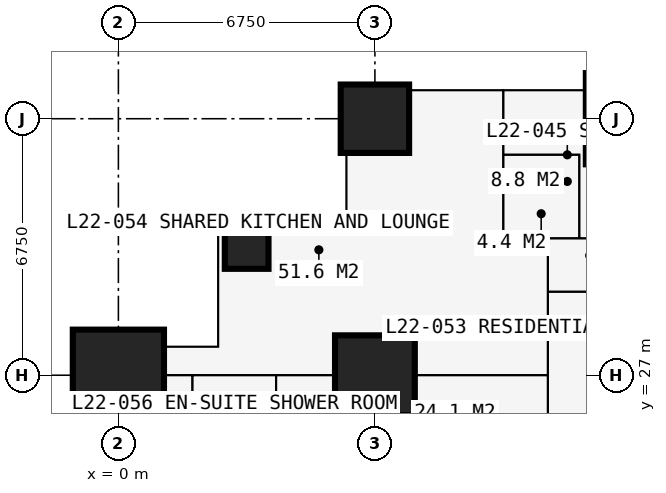
"""IFC4 building model, lengths in metres.
Left out: names, types, materials, properties, quantities, classifications, styles, units other than length and angle.
Written with IfcOpenShell. Run it as: python <this file> out.ifc"""

import sys

from ifc_helpers import new_model, si_unit, direction, frame, frame_2d, origin, origin_2d, place, context, subcontext, project, spatial, rectangle, extrude, element, fill, save


model = new_model("IFC4")
c1 = context("Model", 3, precision=1e-05, world=origin(), true_north=direction((0.0, 1.0)))
c2 = subcontext(c1, "Body", "Model", "MODEL_VIEW")
j1 = project(units=[si_unit("LENGTHUNIT", "METRE"), si_unit("PLANEANGLEUNIT", "RADIAN")], contexts=[c1])
p1 = place(None, origin())
s1 = spatial("IfcSite", under=j1, at=p1, CompositionType="ELEMENT")
p2 = place(p1, origin())
s2 = spatial("IfcBuilding", under=s1, at=p2, CompositionType="ELEMENT")
p3 = place(p2, frame((0.0, 0.0, 83.7)))
s3 = spatial("IfcBuildingStorey", under=s2, at=p3, CompositionType="ELEMENT", Elevation=83.7)
p4 = place(p3, frame((0.0, 27.0, 0.0), z_axis=(0.0, 0.0, 1.0), x_axis=(1.0, 0.0, 0.0)))
e1 = element("IfcColumn", 1, at=p4, inside=s3, PredefinedType="COLUMN", context=c2, shape_type="SweptSolid", body=[
    extrude(rectangle(XDim=2.4, YDim=2.4, at=origin_2d()), origin(), (0.0, 0.0, 1.0), 3.6),
])
p5 = place(p3, frame((3.375, 30.375, 0.0), z_axis=(0.0, 0.0, 1.0), x_axis=(1.0, 0.0, 0.0)))
e2 = element("IfcColumn", 2, at=p5, inside=s3, PredefinedType="COLUMN", context=c2, shape_type="SweptSolid", body=[
    extrude(rectangle(XDim=1.15, YDim=1.15, at=origin_2d()), origin(), (0.0, 0.0, 1.0), 3.6),
])
p6 = place(p3, frame((6.75, 27.0, 0.0), z_axis=(0.0, 0.0, 1.0), x_axis=(1.0, 0.0, 0.0)))
e3 = element("IfcColumn", 3, at=p6, inside=s3, PredefinedType="COLUMN", context=c2, shape_type="SweptSolid", body=[
    extrude(rectangle(XDim=2.1, YDim=2.1, at=origin_2d()), origin(), (0.0, 0.0, 1.0), 3.6),
])
p7 = place(p3, frame((6.75, 33.75, 0.0), z_axis=(0.0, 0.0, 1.0), x_axis=(1.0, 0.0, 0.0)))
e4 = element("IfcColumn", 4, at=p7, inside=s3, PredefinedType="COLUMN", context=c2, shape_type="SweptSolid", body=[
    extrude(rectangle(XDim=1.8, YDim=1.8, at=origin_2d()), origin(), (0.0, 0.0, 1.0), 3.6),
])
p8 = place(p3, frame((6.0, 34.5, 0.0), z_axis=(0.0, 0.0, 1.0), x_axis=(0.0, -1.0, 0.0)))
e5 = element("IfcWall", 5, at=p8, inside=s3, PredefinedType="SOLIDWALL", context=c2, shape_type="SweptSolid", body=[
    extrude(rectangle(XDim=3.375, YDim=0.3, at=frame_2d((1.688, 0.0))), origin(), (0.0, 0.0, 1.0), 3.375),
])
p9 = place(p8, frame((1.833, 0.0, 0.9)))
e6 = element("IfcOpeningElement", 6, at=p9, cuts=e5, PredefinedType="OPENING", context=c2, shape_type="SweptSolid", body=[
    extrude(rectangle(XDim=1.2, YDim=1.8, at=frame_2d((0.6, 0.9))), frame((0.0, 0.16, 0.0), z_axis=(0.0, -1.0, 0.0), x_axis=(1.0, 0.0, 0.0)), (0.0, 0.0, 1.0), 0.32),
])
p10 = place(p3, frame((6.0, 31.125, 0.0), z_axis=(0.0, 0.0, 1.0), x_axis=(-1.0, 0.0, 0.0)))
e7 = element("IfcWall", 7, at=p10, inside=s3, PredefinedType="SOLIDWALL", context=c2, shape_type="SweptSolid", body=[
    extrude(rectangle(XDim=3.375, YDim=0.3, at=frame_2d((1.688, 0.0))), origin(), (0.0, 0.0, 1.0), 3.375),
])
p11 = place(p10, frame((0.788, 0.0, 0.6)))
e8 = element("IfcOpeningElement", 8, at=p11, cuts=e7, PredefinedType="OPENING", context=c2, shape_type="SweptSolid", body=[
    extrude(rectangle(XDim=1.8, YDim=2.1, at=frame_2d((0.9, 1.05))), frame((0.0, 0.16, 0.0), z_axis=(0.0, -1.0, 0.0), x_axis=(1.0, 0.0, 0.0)), (0.0, 0.0, 1.0), 0.32),
])
p12 = place(p3, frame((2.625, 31.125, 0.0), z_axis=(0.0, 0.0, 1.0), x_axis=(0.0, -1.0, 0.0)))
e9 = element("IfcWall", 9, at=p12, inside=s3, PredefinedType="SOLIDWALL", context=c2, shape_type="SweptSolid", body=[
    extrude(rectangle(XDim=3.375, YDim=0.3, at=frame_2d((1.688, 0.0))), origin(), (0.0, 0.0, 1.0), 3.375),
])
p13 = place(p12, frame((0.788, 0.0, 0.6)))
e10 = element("IfcOpeningElement", 10, at=p13, cuts=e9, PredefinedType="OPENING", context=c2, shape_type="SweptSolid", body=[
    extrude(rectangle(XDim=1.8, YDim=2.1, at=frame_2d((0.9, 1.05))), frame((0.0, 0.16, 0.0), z_axis=(0.0, -1.0, 0.0), x_axis=(1.0, 0.0, 0.0)), (0.0, 0.0, 1.0), 0.32),
])
p14 = place(p3, frame((2.625, 27.75, 0.0), z_axis=(0.0, 0.0, 1.0), x_axis=(-1.0, 0.0, 0.0)))
e11 = element("IfcWall", 11, at=p14, inside=s3, PredefinedType="SOLIDWALL", context=c2, shape_type="SweptSolid", body=[
    extrude(rectangle(XDim=3.375, YDim=0.3, at=frame_2d((1.688, 0.0))), origin(), (0.0, 0.0, 1.0), 3.375),
])
p15 = place(p14, frame((0.192, 0.0, 0.9)))
e12 = element("IfcOpeningElement", 12, at=p15, cuts=e11, PredefinedType="OPENING", context=c2, shape_type="SweptSolid", body=[
    extrude(rectangle(XDim=1.2, YDim=1.8, at=frame_2d((0.6, 0.9))), frame((0.0, 0.16, 0.0), z_axis=(0.0, -1.0, 0.0), x_axis=(1.0, 0.0, 0.0)), (0.0, 0.0, 1.0), 0.32),
])
p16 = place(p3, frame((-0.734, 27.0, 0.0), z_axis=(0.0, 0.0, 1.0), x_axis=(1.0, 0.0, 0.0)))
e13 = element("IfcWall", 13, at=p16, inside=s3, PredefinedType="PARTITIONING", context=c2, shape_type="SweptSolid", body=[
    extrude(rectangle(XDim=12.034, YDim=0.15, at=frame_2d((6.017, 0.0))), origin(), (0.0, 0.0, 1.0), 2.806),
])
p17 = place(p16, frame((8.534, 0.0, 0.0)))
e14 = element("IfcOpeningElement", 14, at=p17, cuts=e13, PredefinedType="OPENING", context=c2, shape_type="SweptSolid", body=[
    extrude(rectangle(XDim=1.0, YDim=2.2, at=frame_2d((0.5, 1.1))), frame((0.0, 0.085, 0.0), z_axis=(0.0, -1.0, 0.0), x_axis=(1.0, 0.0, 0.0)), (0.0, 0.0, 1.0), 0.17),
])
p18 = place(p3, frame((1.95, 25.0, 0.0), z_axis=(0.0, 0.0, 1.0), x_axis=(0.0, 1.0, 0.0)))
e15 = element("IfcWall", 15, at=p18, inside=s3, PredefinedType="PARTITIONING", context=c2, shape_type="SweptSolid", body=[
    extrude(rectangle(XDim=2.0, YDim=0.1, at=frame_2d((1.0, 0.0))), origin(), (0.0, 0.0, 1.0), 3.375),
])
p19 = place(p3, frame((4.15, 10.125, 0.0), z_axis=(0.0, 0.0, 1.0), x_axis=(0.0, 1.0, 0.0)))
e16 = element("IfcWall", 16, at=p19, inside=s3, PredefinedType="PARTITIONING", context=c2, shape_type="SweptSolid", body=[
    extrude(rectangle(XDim=16.875, YDim=0.15, at=frame_2d((8.438, 0.0))), origin(), (0.0, 0.0, 1.0), 3.375),
])
p20 = place(p19, frame((13.7, 0.0, 0.0)))
e17 = element("IfcOpeningElement", 17, at=p20, cuts=e16, PredefinedType="OPENING", context=c2, shape_type="SweptSolid", body=[
    extrude(rectangle(XDim=0.95, YDim=2.2, at=frame_2d((0.475, 1.1))), frame((0.0, 0.085, 0.0), z_axis=(0.0, -1.0, 0.0), x_axis=(1.0, 0.0, 0.0)), (0.0, 0.0, 1.0), 0.17),
])
p21 = place(p19, frame((7.575, 0.0, 0.0)))
e18 = element("IfcOpeningElement", 18, at=p21, cuts=e16, PredefinedType="OPENING", context=c2, shape_type="SweptSolid", body=[
    extrude(rectangle(XDim=0.95, YDim=2.2, at=frame_2d((0.475, 1.1))), frame((0.0, 0.085, 0.0), z_axis=(0.0, -1.0, 0.0), x_axis=(1.0, 0.0, 0.0)), (0.0, 0.0, 1.0), 0.17),
])
p22 = place(p19, frame((0.2, 0.0, 0.0)))
e19 = element("IfcOpeningElement", 19, at=p22, cuts=e16, PredefinedType="OPENING", context=c2, shape_type="SweptSolid", body=[
    extrude(rectangle(XDim=0.95, YDim=2.2, at=frame_2d((0.475, 1.1))), frame((0.0, 0.085, 0.0), z_axis=(0.0, -1.0, 0.0), x_axis=(1.0, 0.0, 0.0)), (0.0, 0.0, 1.0), 0.17),
])
p23 = place(p19, frame((10.375, 0.0, 0.0)))
e20 = element("IfcOpeningElement", 20, at=p23, cuts=e16, PredefinedType="OPENING", context=c2, shape_type="SweptSolid", body=[
    extrude(rectangle(XDim=0.95, YDim=2.2, at=frame_2d((0.475, 1.1))), frame((0.0, 0.085, 0.0), z_axis=(0.0, -1.0, 0.0), x_axis=(1.0, 0.0, 0.0)), (0.0, 0.0, 1.0), 0.17),
])
p24 = place(p3, frame((10.125, 30.6, 0.0), z_axis=(0.0, 0.0, 1.0), x_axis=(0.0, 1.0, 0.0)))
e21 = element("IfcWall", 21, at=p24, inside=s3, PredefinedType="PARTITIONING", context=c2, shape_type="SweptSolid", body=[
    extrude(rectangle(XDim=3.884, YDim=0.1, at=frame_2d((1.942, 0.0))), origin(), (0.0, 0.0, 1.0), 3.375),
])
p25 = place(p3, frame((10.125, 30.6, 0.0), z_axis=(0.0, 0.0, 1.0), x_axis=(1.0, 0.0, 0.0)))
e22 = element("IfcWall", 22, at=p25, inside=s3, PredefinedType="PARTITIONING", context=c2, shape_type="SweptSolid", body=[
    extrude(rectangle(XDim=3.375, YDim=0.1, at=frame_2d((1.688, 0.0))), origin(), (0.0, 0.0, 1.0), 3.375),
])
p26 = place(p25, frame((2.2, 0.0, 0.0)))
e23 = element("IfcOpeningElement", 23, at=p26, cuts=e22, PredefinedType="OPENING", context=c2, shape_type="SweptSolid", body=[
    extrude(rectangle(XDim=0.95, YDim=2.2, at=frame_2d((0.475, 1.1))), frame((0.0, 0.06, 0.0), z_axis=(0.0, -1.0, 0.0), x_axis=(1.0, 0.0, 0.0)), (0.0, 0.0, 1.0), 0.12),
])
p27 = place(p3, frame((10.125, 32.8, 0.0), z_axis=(0.0, 0.0, 1.0), x_axis=(1.0, 0.0, 0.0)))
e24 = element("IfcWall", 24, at=p27, inside=s3, PredefinedType="PARTITIONING", context=c2, shape_type="SweptSolid", body=[
    extrude(rectangle(XDim=2.0, YDim=0.1, at=frame_2d((1.0, 0.0))), origin(), (0.0, 0.0, 1.0), 3.375),
])
p28 = place(p3, frame((11.3, 11.3, 0.0), z_axis=(0.0, 0.0, 1.0), x_axis=(0.0, 1.0, 0.0)))
e25 = element("IfcWall", 25, at=p28, inside=s3, PredefinedType="PARTITIONING", context=c2, shape_type="SweptSolid", body=[
    extrude(rectangle(XDim=19.3, YDim=0.15, at=frame_2d((9.65, 0.0))), origin(), (0.0, 0.0, 1.0), 3.375),
])
p29 = place(p28, frame((13.525, 0.0, 0.0)))
e26 = element("IfcOpeningElement", 26, at=p29, cuts=e25, PredefinedType="OPENING", context=c2, shape_type="SweptSolid", body=[
    extrude(rectangle(XDim=1.0, YDim=2.2, at=frame_2d((0.5, 1.1))), frame((0.0, 0.085, 0.0), z_axis=(0.0, -1.0, 0.0), x_axis=(1.0, 0.0, 0.0)), (0.0, 0.0, 1.0), 0.17),
])
p30 = place(p28, frame((10.438, 0.0, 0.0)))
e27 = element("IfcOpeningElement", 27, at=p30, cuts=e25, PredefinedType="OPENING", context=c2, shape_type="SweptSolid", body=[
    extrude(rectangle(XDim=1.0, YDim=2.2, at=frame_2d((0.5, 1.1))), frame((0.0, 0.085, 0.0), z_axis=(0.0, -1.0, 0.0), x_axis=(1.0, 0.0, 0.0)), (0.0, 0.0, 1.0), 0.17),
])
p31 = place(p3, frame((11.3, 29.2, 0.0), z_axis=(0.0, 0.0, 1.0), x_axis=(1.0, 0.0, 0.0)))
e28 = element("IfcWall", 28, at=p31, inside=s3, PredefinedType="PARTITIONING", context=c2, shape_type="SweptSolid", body=[
    extrude(rectangle(XDim=19.075, YDim=0.15, at=frame_2d((9.538, 0.0))), origin(), (0.0, 0.0, 1.0), 3.375),
])
p32 = place(p31, frame((5.825, 0.0, 0.0)))
e29 = element("IfcOpeningElement", 29, at=p32, cuts=e28, PredefinedType="OPENING", context=c2, shape_type="SweptSolid", body=[
    extrude(rectangle(XDim=0.95, YDim=2.2, at=frame_2d((0.475, 1.1))), frame((0.0, 0.085, 0.0), z_axis=(0.0, -1.0, 0.0), x_axis=(1.0, 0.0, 0.0)), (0.0, 0.0, 1.0), 0.17),
])
p33 = place(p31, frame((9.2, 0.0, 0.0)))
e30 = element("IfcOpeningElement", 30, at=p33, cuts=e28, PredefinedType="OPENING", context=c2, shape_type="SweptSolid", body=[
    extrude(rectangle(XDim=0.95, YDim=2.2, at=frame_2d((0.475, 1.1))), frame((0.0, 0.085, 0.0), z_axis=(0.0, -1.0, 0.0), x_axis=(1.0, 0.0, 0.0)), (0.0, 0.0, 1.0), 0.17),
])
p34 = place(p31, frame((0.6, 0.0, 0.0)))
e31 = element("IfcOpeningElement", 31, at=p34, cuts=e28, PredefinedType="OPENING", context=c2, shape_type="SweptSolid", body=[
    extrude(rectangle(XDim=1.0, YDim=2.2, at=frame_2d((0.5, 1.1))), frame((0.0, 0.085, 0.0), z_axis=(0.0, -1.0, 0.0), x_axis=(1.0, 0.0, 0.0)), (0.0, 0.0, 1.0), 0.17),
])
p35 = place(p3, frame((12.125, 30.6, 0.0), z_axis=(0.0, 0.0, 1.0), x_axis=(0.0, 1.0, 0.0)))
e32 = element("IfcWall", 32, at=p35, inside=s3, PredefinedType="PARTITIONING", context=c2, shape_type="SweptSolid", body=[
    extrude(rectangle(XDim=2.2, YDim=0.1, at=frame_2d((1.1, 0.0))), origin(), (0.0, 0.0, 1.0), 3.375),
])
p36 = place(p35, frame((0.65, 0.0, 0.0)))
e33 = element("IfcOpeningElement", 33, at=p36, cuts=e32, PredefinedType="OPENING", context=c2, shape_type="SweptSolid", body=[
    extrude(rectangle(XDim=0.9, YDim=2.2, at=frame_2d((0.45, 1.1))), frame((0.0, 0.06, 0.0), z_axis=(0.0, -1.0, 0.0), x_axis=(1.0, 0.0, 0.0)), (0.0, 0.0, 1.0), 0.12),
])
p37 = place(p9, origin())
e34 = element("IfcWindow", 34, at=p37, inside=s3, PartitioningType="SINGLE_PANEL", PredefinedType="WINDOW", context=c2, shape_type="SweptSolid", body=[
    extrude(rectangle(XDim=1.2, YDim=1.8, at=frame_2d((0.6, 0.9))), frame((0.0, 0.03, 0.0), z_axis=(0.0, -1.0, 0.0), x_axis=(1.0, 0.0, 0.0)), (0.0, 0.0, 1.0), 0.06),
])
fill(e6, e34)
p38 = place(p11, origin())
e35 = element("IfcWindow", 35, at=p38, inside=s3, PartitioningType="SINGLE_PANEL", PredefinedType="WINDOW", context=c2, shape_type="SweptSolid", body=[
    extrude(rectangle(XDim=1.8, YDim=2.1, at=frame_2d((0.9, 1.05))), frame((0.0, 0.03, 0.0), z_axis=(0.0, -1.0, 0.0), x_axis=(1.0, 0.0, 0.0)), (0.0, 0.0, 1.0), 0.06),
])
fill(e8, e35)
p39 = place(p13, origin())
e36 = element("IfcWindow", 36, at=p39, inside=s3, PartitioningType="SINGLE_PANEL", PredefinedType="WINDOW", context=c2, shape_type="SweptSolid", body=[
    extrude(rectangle(XDim=1.8, YDim=2.1, at=frame_2d((0.9, 1.05))), frame((0.0, 0.03, 0.0), z_axis=(0.0, -1.0, 0.0), x_axis=(1.0, 0.0, 0.0)), (0.0, 0.0, 1.0), 0.06),
])
fill(e10, e36)
p40 = place(p15, origin())
e37 = element("IfcWindow", 37, at=p40, inside=s3, PartitioningType="SINGLE_PANEL", PredefinedType="WINDOW", context=c2, shape_type="SweptSolid", body=[
    extrude(rectangle(XDim=1.2, YDim=1.8, at=frame_2d((0.6, 0.9))), frame((0.0, 0.03, 0.0), z_axis=(0.0, -1.0, 0.0), x_axis=(1.0, 0.0, 0.0)), (0.0, 0.0, 1.0), 0.06),
])
fill(e12, e37)
p41 = place(p36, origin())
e38 = element("IfcDoor", 38, at=p41, inside=s3, OperationType="SINGLE_SWING_RIGHT", PredefinedType="DOOR", context=c2, shape_type="SweptSolid", body=[
    extrude(rectangle(XDim=0.9, YDim=2.2, at=frame_2d((0.45, 1.1))), frame((0.0, 0.025, 0.0), z_axis=(0.0, -1.0, 0.0), x_axis=(1.0, 0.0, 0.0)), (0.0, 0.0, 1.0), 0.05),
])
fill(e33, e38)
p42 = place(p34, origin())
e39 = element("IfcDoor", 39, at=p42, inside=s3, OperationType="SINGLE_SWING_LEFT", PredefinedType="DOOR", context=c2, shape_type="SweptSolid", body=[
    extrude(rectangle(XDim=1.0, YDim=2.2, at=frame_2d((0.5, 1.1))), frame((0.0, 0.025, 0.0), z_axis=(0.0, -1.0, 0.0), x_axis=(1.0, 0.0, 0.0)), (0.0, 0.0, 1.0), 0.05),
])
fill(e31, e39)
p43 = place(p17, origin())
e40 = element("IfcDoor", 40, at=p43, inside=s3, OperationType="SINGLE_SWING_LEFT", PredefinedType="DOOR", context=c2, shape_type="SweptSolid", body=[
    extrude(rectangle(XDim=1.0, YDim=2.2, at=frame_2d((0.5, 1.1))), frame((0.0, 0.025, 0.0), z_axis=(0.0, -1.0, 0.0), x_axis=(1.0, 0.0, 0.0)), (0.0, 0.0, 1.0), 0.05),
])
fill(e14, e40)
save(model, sys.argv[1])
